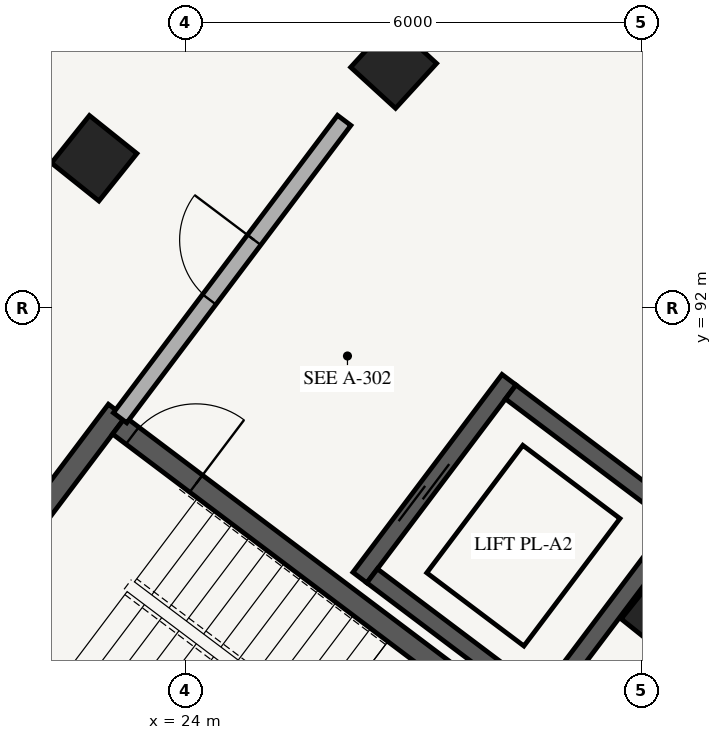
"""IFC4 building model, lengths in metres.
Left out: names, types, materials, properties, quantities, classifications, styles, units other than length and angle.
Written with IfcOpenShell. Run it as: python <this file> out.ifc"""

import sys

from ifc_helpers import new_model, si_unit, direction, frame, frame_2d, origin, origin_2d, place, context, subcontext, project, spatial, rectangle, extrude, element, fill, save


model = new_model("IFC4")
c1 = context("Model", 3, precision=1e-05, world=origin(), true_north=direction((0.0, 1.0)))
c2 = subcontext(c1, "Body", "Model", "MODEL_VIEW")
j1 = project(units=[si_unit("LENGTHUNIT", "METRE"), si_unit("PLANEANGLEUNIT", "RADIAN")], contexts=[c1])
p1 = place(None, origin())
s1 = spatial("IfcSite", under=j1, at=p1, CompositionType="ELEMENT")
p2 = place(p1, origin())
s2 = spatial("IfcBuilding", under=s1, at=p2, CompositionType="ELEMENT")
p3 = place(p2, frame((0.0, 0.0, -4.2)))
s3 = spatial("IfcBuildingStorey", under=s2, at=p3, CompositionType="ELEMENT", Elevation=-4.2)
p4 = place(p3, frame((21.199, 87.897, 0.0), z_axis=(0.0, 0.0, 1.0), x_axis=(0.798639633744, -0.601809550782, 0.0)))
e1 = element("IfcWall", 1, at=p4, inside=s3, PredefinedType="SHEAR", context=c2, shape_type="SweptSolid", body=[
    extrude(rectangle(XDim=6.6, YDim=0.28, at=frame_2d((3.3, 0.0))), origin(), (0.0, 0.0, 1.0), 3.92),
])
p5 = place(p3, frame((21.003, 87.87, 0.0), z_axis=(0.0, 0.0, 1.0), x_axis=(0.601794470585, 0.798650997102, 0.0)))
e2 = element("IfcWall", 2, at=p5, inside=s3, PredefinedType="SHEAR", context=c2, shape_type="SweptSolid", body=[
    extrude(rectangle(XDim=3.48, YDim=0.28, at=frame_2d((1.74, 0.0))), origin(), (0.0, 0.0, 1.0), 3.92),
])
p6 = place(p3, frame((23.125, 90.453, 0.0), z_axis=(0.0, 0.0, 1.0), x_axis=(0.798639633744, -0.601809550782, 0.0)))
e3 = element("IfcWall", 3, at=p6, inside=s3, PredefinedType="SHEAR", context=c2, shape_type="SweptSolid", body=[
    extrude(rectangle(XDim=6.6, YDim=0.28, at=frame_2d((3.3, 0.0))), origin(), (0.0, 0.0, 1.0), 3.92),
])
p7 = place(p6, frame((0.22, 0.0, 0.0)))
e4 = element("IfcOpeningElement", 4, at=p7, cuts=e3, PredefinedType="OPENING", context=c2, shape_type="SweptSolid", body=[
    extrude(rectangle(XDim=1.05, YDim=2.15, at=frame_2d((0.525, 1.075))), frame((0.0, 0.15, 0.0), z_axis=(0.0, -1.0, 0.0), x_axis=(1.0, 0.0, 0.0)), (0.0, 0.0, 1.0), 0.3),
])
p8 = place(p3, frame((26.294, 88.453, 0.0), z_axis=(0.0, 0.0, 1.0), x_axis=(0.601819781152, 0.798631924615, 0.0)))
e5 = element("IfcWall", 5, at=p8, inside=s3, PredefinedType="SHEAR", context=c2, shape_type="SweptSolid", body=[
    extrude(rectangle(XDim=3.26, YDim=0.23, at=frame_2d((1.63, 0.0))), origin(), (0.0, 0.0, 1.0), 3.92),
])
p9 = place(p8, frame((0.9, 0.0, 0.0)))
e6 = element("IfcOpeningElement", 6, at=p9, cuts=e5, PredefinedType="OPENING", context=c2, shape_type="SweptSolid", body=[
    extrude(rectangle(XDim=1.0, YDim=2.15, at=frame_2d((0.5, 1.075))), frame((0.0, 0.125, 0.0), z_axis=(0.0, -1.0, 0.0), x_axis=(1.0, 0.0, 0.0)), (0.0, 0.0, 1.0), 0.25),
])
p10 = place(p3, frame((28.634, 86.69, 0.0), z_axis=(0.0, 0.0, 1.0), x_axis=(0.601819781152, 0.798631924615, 0.0)))
e7 = element("IfcWall", 7, at=p10, inside=s3, PredefinedType="SHEAR", context=c2, shape_type="SweptSolid", body=[
    extrude(rectangle(XDim=3.26, YDim=0.23, at=frame_2d((1.63, 0.0))), origin(), (0.0, 0.0, 1.0), 3.92),
])
for number, where, z_axis, x_axis in (
    (8, (26.455, 88.476, 0.0), (0.0, 0.0, 1.0), (0.799, -0.602, 0.0)),
    (9, (28.279, 90.896, 0.0), (0.0, 0.0, 1.0), (0.799, -0.602, 0.0)),
):
    element("IfcWall", number, at=place(p3, frame(where, z_axis=z_axis, x_axis=x_axis)), inside=s3, PredefinedType="SHEAR", context=c2, shape_type="SweptSolid", body=[
        extrude(rectangle(XDim=2.7, YDim=0.23, at=frame_2d((1.35, 0.0))), origin(), (0.0, 0.0, 1.0), 3.92),
    ])
for number, where, z_axis, x_axis in (
    (10, (26.738, 95.192, 0.0), (0.0, 0.0, 1.0), (-0.738, 0.675, 0.0)),
    (11, (30.294, 87.972, 0.0), (0.0, 0.0, 1.0), (-0.781, 0.625, 0.0)),
    (12, (22.798, 93.97, 0.0), (0.0, 0.0, 1.0), (-0.781, 0.625, 0.0)),
):
    element("IfcColumn", number, at=place(p3, frame(where, z_axis=z_axis, x_axis=x_axis)), inside=s3, PredefinedType="COLUMN", context=c2, shape_type="SweptSolid", body=[
        extrude(rectangle(XDim=0.8, YDim=0.8, at=origin_2d()), origin(), (0.0, 0.0, 1.0), 3.92),
    ])
p11 = place(p3, frame((23.139, 90.555, 0.0), z_axis=(0.0, 0.0, 1.0), x_axis=(0.601792209296, 0.79865270101, 0.0)))
e13 = element("IfcWall", 13, at=p11, inside=s3, PredefinedType="PARTITIONING", context=c2, shape_type="SweptSolid", body=[
    extrude(rectangle(XDim=4.9, YDim=0.22, at=frame_2d((2.45, 0.0))), origin(), (0.0, 0.0, 1.0), 3.18),
])
p12 = place(p11, frame((1.95, 0.0, 0.0)))
e14 = element("IfcOpeningElement", 14, at=p12, cuts=e13, PredefinedType="OPENING", context=c2, shape_type="SweptSolid", body=[
    extrude(rectangle(XDim=0.98, YDim=2.14, at=frame_2d((0.49, 1.07))), frame((0.0, 0.12, 0.0), z_axis=(0.0, -1.0, 0.0), x_axis=(1.0, 0.0, 0.0)), (0.0, 0.0, 1.0), 0.24),
])
p13 = place(p7, origin())
e15 = element("IfcDoor", 15, at=p13, inside=s3, OperationType="SINGLE_SWING_RIGHT", PredefinedType="DOOR", context=c2, shape_type="SweptSolid", body=[
    extrude(rectangle(XDim=1.05, YDim=2.15, at=frame_2d((0.525, 1.075))), frame((0.0, 0.025, 0.0), z_axis=(0.0, -1.0, 0.0), x_axis=(1.0, 0.0, 0.0)), (0.0, 0.0, 1.0), 0.05),
])
fill(e4, e15)
p14 = place(p9, origin())
e16 = element("IfcDoor", 16, at=p14, inside=s3, OperationType="DOUBLE_DOOR_SLIDING", PredefinedType="DOOR", context=c2, shape_type="SweptSolid", body=[
    extrude(rectangle(XDim=1.0, YDim=2.15, at=frame_2d((0.5, 1.075))), frame((0.0, 0.025, 0.0), z_axis=(0.0, -1.0, 0.0), x_axis=(1.0, 0.0, 0.0)), (0.0, 0.0, 1.0), 0.05),
])
fill(e6, e16)
p15 = place(p12, origin())
e17 = element("IfcDoor", 17, at=p15, inside=s3, OperationType="SINGLE_SWING_RIGHT", PredefinedType="DOOR", context=c2, shape_type="SweptSolid", body=[
    extrude(rectangle(XDim=0.98, YDim=2.14, at=frame_2d((0.49, 1.07))), frame((0.0, 0.025, 0.0), z_axis=(0.0, -1.0, 0.0), x_axis=(1.0, 0.0, 0.0)), (0.0, 0.0, 1.0), 0.05),
])
fill(e14, e17)
save(model, sys.argv[1])
